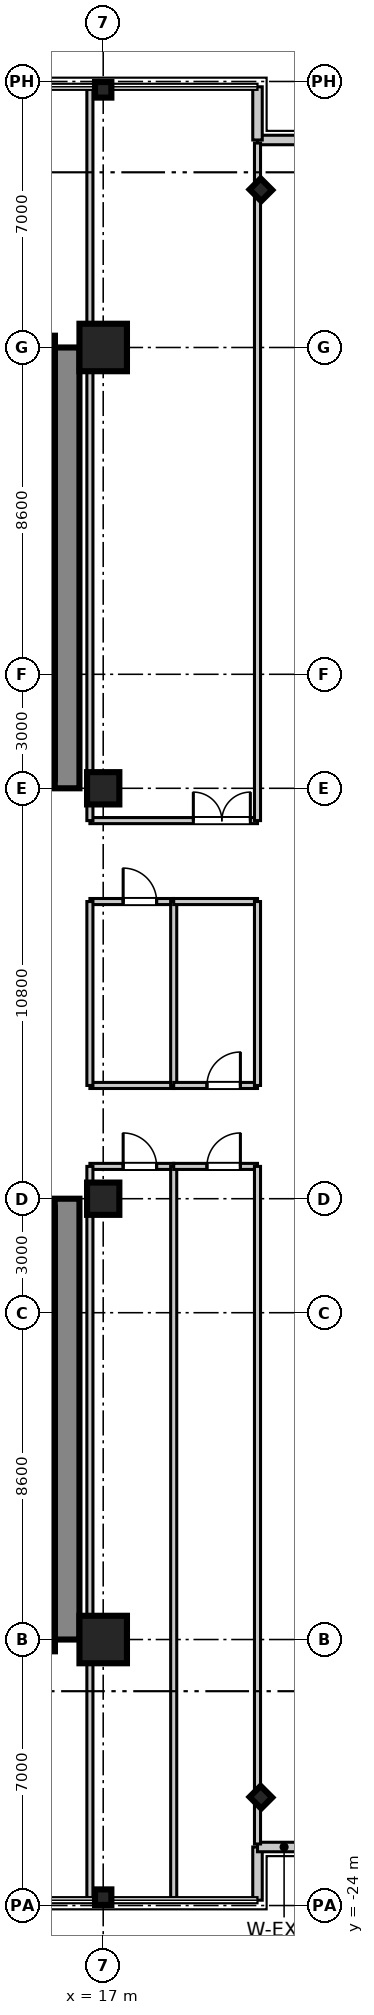
"""IFC4 building model, lengths in metres.
Left out: names, types, materials, properties, quantities, classifications, styles, units other than length and angle.
Written with IfcOpenShell. Run it as: python <this file> out.ifc"""

import sys

from ifc_helpers import new_model, si_unit, direction, frame, frame_2d, origin, origin_2d, place, context, subcontext, project, spatial, rectangle, i_section, extrude, source, transform, mapped, element, fill, save


model = new_model("IFC4")
c1 = context("Model", 3, precision=1e-05, world=origin(), true_north=direction((0.0, 1.0)))
c2 = subcontext(c1, "Body", "Model", "MODEL_VIEW")
j1 = project(units=[si_unit("LENGTHUNIT", "METRE"), si_unit("PLANEANGLEUNIT", "RADIAN")], contexts=[c1])
p1 = place(None, origin())
s1 = spatial("IfcSite", under=j1, at=p1, CompositionType="ELEMENT")
p2 = place(p1, origin())
s2 = spatial("IfcBuilding", under=s1, at=p2, CompositionType="ELEMENT")
p3 = place(p2, frame((0.0, 0.0, 102.9)))
s3 = spatial("IfcBuildingStorey", under=s2, at=p3, CompositionType="ELEMENT", Elevation=102.9)
m1 = source(origin(), c2, "Body", "SweptSolid", [
    extrude(rectangle(XDim=1.25, YDim=1.25, at=origin_2d()), origin(), (0.0, 0.0, 1.0), 3.605),
])
p4 = place(p3, frame((17.0, -17.0, 0.0), z_axis=(0.0, 0.0, 1.0), x_axis=(1.0, 0.0, 0.0)))
e1 = element("IfcColumn", 1, at=p4, inside=s3, PredefinedType="COLUMN", context=c2, shape_type="MappedRepresentation", body=[
    mapped(m1, transform((0.0, 0.0, 0.0), scale=1.0)),
])
m2 = source(origin(), c2, "Body", "SweptSolid", [
    extrude(rectangle(XDim=0.85, YDim=0.85, at=origin_2d()), origin(), (0.0, 0.0, 1.0), 3.605),
])
for number, where, z_axis, x_axis in (
    (2, (17.0, -5.4, 0.0), (0.0, 0.0, 1.0), (1.0, 0.0, 0.0)),
    (3, (17.0, 5.4, 0.0), (0.0, 0.0, 1.0), (1.0, 0.0, 0.0)),
):
    element("IfcColumn", number, at=place(p3, frame(where, z_axis=z_axis, x_axis=x_axis)), inside=s3, PredefinedType="PILASTER", context=c2, shape_type="MappedRepresentation", body=[
        mapped(m2, transform((0.0, 0.0, 0.0), scale=1.0)),
    ])
p5 = place(p3, frame((17.0, 17.0, 0.0), z_axis=(0.0, 0.0, 1.0), x_axis=(1.0, 0.0, 0.0)))
e4 = element("IfcColumn", 4, at=p5, inside=s3, PredefinedType="COLUMN", context=c2, shape_type="MappedRepresentation", body=[
    mapped(m1, transform((0.0, 0.0, 0.0), scale=1.0)),
])
m3 = source(origin(), c2, "Body", "SweptSolid", [
    extrude(i_section(OverallWidth=0.409, OverallDepth=0.43, WebThickness=0.021, FlangeThickness=0.034, at=origin_2d()), origin(), (0.0, 0.0, 1.0), 3.605),
])
for number, where, z_axis, x_axis in (
    (5, (17.0, -23.78, 0.0), (0.0, 0.0, 1.0), (0.0, 1.0, 0.0)),
    (6, (17.0, 23.78, 0.0), (0.0, 0.0, 1.0), (0.0, 1.0, 0.0)),
    (7, (21.15, -21.15, 0.0), (0.0, 0.0, 1.0), (0.707, 0.707, 0.0)),
    (8, (21.15, 21.15, 0.0), (0.0, 0.0, 1.0), (0.707, 0.707, 0.0)),
):
    element("IfcColumn", number, at=place(p3, frame(where, z_axis=z_axis, x_axis=x_axis)), inside=s3, PredefinedType="COLUMN", context=c2, shape_type="MappedRepresentation", body=[
        mapped(m3, transform((0.0, 0.0, 0.0), scale=1.0)),
    ])
m4 = source(origin(), c2, "Body", "SweptSolid", [
    extrude(rectangle(XDim=11.6, YDim=0.65, at=frame_2d((5.8, 0.0))), origin(), (0.0, 0.0, 1.0), 3.38),
])
for number, where, z_axis, x_axis in (
    (9, (16.05, 5.4, 0.0), (0.0, 0.0, 1.0), (0.0, 1.0, 0.0)),
    (10, (16.05, -17.0, 0.0), (0.0, 0.0, 1.0), (0.0, 1.0, 0.0)),
):
    element("IfcWall", number, at=place(p3, frame(where, z_axis=z_axis, x_axis=x_axis)), inside=s3, PredefinedType="SHEAR", context=c2, shape_type="MappedRepresentation", body=[
        mapped(m4, transform((0.0, 0.0, 0.0), scale=1.0)),
    ])
m5 = source(origin(), c2, "Body", "SweptSolid", [
    extrude(rectangle(XDim=2.36, YDim=0.22, at=frame_2d((1.18, 0.0))), origin(), (0.0, 0.0, 1.0), 3.38),
])
p6 = place(p3, frame((15.62, 5.64, 0.0), z_axis=(0.0, 0.0, 1.0), x_axis=(0.0, 1.0, 0.0)))
e11 = element("IfcWall", 11, at=p6, inside=s3, PredefinedType="SHEAR", context=c2, shape_type="MappedRepresentation", body=[
    mapped(m5, transform((0.0, 0.0, 0.0), scale=1.0)),
])
m6 = source(origin(), c2, "Body", "SweptSolid", [
    extrude(rectangle(XDim=2.2, YDim=0.22, at=frame_2d((1.1, 0.0))), origin(), (0.0, 0.0, 1.0), 3.38),
])
for number, where, z_axis, x_axis in (
    (12, (15.62, 8.0, 0.0), (0.0, 0.0, 1.0), (0.0, 1.0, 0.0)),
    (13, (15.62, 10.2, 0.0), (0.0, 0.0, 1.0), (0.0, 1.0, 0.0)),
):
    element("IfcWall", number, at=place(p3, frame(where, z_axis=z_axis, x_axis=x_axis)), inside=s3, PredefinedType="SHEAR", context=c2, shape_type="MappedRepresentation", body=[
        mapped(m6, transform((0.0, 0.0, 0.0), scale=1.0)),
    ])
m7 = source(origin(), c2, "Body", "SweptSolid", [
    extrude(rectangle(XDim=2.3, YDim=0.22, at=frame_2d((1.15, 0.0))), origin(), (0.0, 0.0, 1.0), 3.38),
])
p7 = place(p3, frame((15.62, 12.4, 0.0), z_axis=(0.0, 0.0, 1.0), x_axis=(0.0, 1.0, 0.0)))
e14 = element("IfcWall", 14, at=p7, inside=s3, PredefinedType="SHEAR", context=c2, shape_type="MappedRepresentation", body=[
    mapped(m7, transform((0.0, 0.0, 0.0), scale=1.0)),
])
p8 = place(p3, frame((15.62, -8.0, 0.0), z_axis=(0.0, 0.0, 1.0), x_axis=(0.0, 1.0, 0.0)))
e15 = element("IfcWall", 15, at=p8, inside=s3, PredefinedType="SHEAR", context=c2, shape_type="MappedRepresentation", body=[
    mapped(m5, transform((0.0, 0.0, 0.0), scale=1.0)),
])
for number, where, z_axis, x_axis in (
    (16, (15.62, -10.2, 0.0), (0.0, 0.0, 1.0), (0.0, 1.0, 0.0)),
    (17, (15.62, -12.4, 0.0), (0.0, 0.0, 1.0), (0.0, 1.0, 0.0)),
):
    element("IfcWall", number, at=place(p3, frame(where, z_axis=z_axis, x_axis=x_axis)), inside=s3, PredefinedType="SHEAR", context=c2, shape_type="MappedRepresentation", body=[
        mapped(m6, transform((0.0, 0.0, 0.0), scale=1.0)),
    ])
p9 = place(p3, frame((15.62, -14.7, 0.0), z_axis=(0.0, 0.0, 1.0), x_axis=(0.0, 1.0, 0.0)))
e18 = element("IfcWall", 18, at=p9, inside=s3, PredefinedType="SHEAR", context=c2, shape_type="MappedRepresentation", body=[
    mapped(m7, transform((0.0, 0.0, 0.0), scale=1.0)),
])
m8 = source(origin(), c2, "Body", "SweptSolid", [
    extrude(rectangle(XDim=2.61, YDim=0.22, at=frame_2d((1.305, 0.0))), origin(), (0.0, 0.0, 1.0), 3.38),
])
for number, where, z_axis, x_axis in (
    (19, (15.62, 14.7, 0.0), (0.0, 0.0, 1.0), (0.0, 1.0, 0.0)),
    (20, (15.62, -17.31, 0.0), (0.0, 0.0, 1.0), (0.0, 1.0, 0.0)),
):
    element("IfcWall", number, at=place(p3, frame(where, z_axis=z_axis, x_axis=x_axis)), inside=s3, PredefinedType="SHEAR", context=c2, shape_type="MappedRepresentation", body=[
        mapped(m8, transform((0.0, 0.0, 0.0), scale=1.0)),
    ])
m9 = source(origin(), c2, "Body", "SweptSolid", [
    extrude(rectangle(XDim=1.4, YDim=0.25, at=frame_2d((0.7, 0.0))), origin(), (0.0, 0.0, 1.0), 3.38),
])
p10 = place(p3, frame((21.06, -23.86, 0.0), z_axis=(0.0, 0.0, 1.0), x_axis=(0.0, 1.0, 0.0)))
e21 = element("IfcWall", 21, at=p10, inside=s3, PredefinedType="STANDARD", context=c2, shape_type="MappedRepresentation", body=[
    mapped(m9, transform((0.0, 0.0, 0.0), scale=1.0)),
])
m10 = source(origin(), c2, "Body", "SweptSolid", [
    extrude(rectangle(XDim=1.4, YDim=0.25, at=frame_2d((0.7, 0.0))), origin(), (0.0, 0.0, 1.0), 3.38),
])
for number, where, z_axis, x_axis in (
    (22, (21.06, -22.46, 0.0), (0.0, 0.0, 1.0), (1.0, 0.0, 0.0)),
    (23, (21.06, 22.46, 0.0), (0.0, 0.0, 1.0), (1.0, 0.0, 0.0)),
):
    element("IfcWall", number, at=place(p3, frame(where, z_axis=z_axis, x_axis=x_axis)), inside=s3, PredefinedType="STANDARD", context=c2, shape_type="MappedRepresentation", body=[
        mapped(m10, transform((0.0, 0.0, 0.0), scale=1.0)),
    ])
p11 = place(p3, frame((21.06, 22.46, 0.0), z_axis=(0.0, 0.0, 1.0), x_axis=(0.0, 1.0, 0.0)))
e24 = element("IfcWall", 24, at=p11, inside=s3, PredefinedType="STANDARD", context=c2, shape_type="MappedRepresentation", body=[
    mapped(m9, transform((0.0, 0.0, 0.0), scale=1.0)),
])
m11 = source(origin(), c2, "Body", "SweptSolid", [
    extrude(rectangle(XDim=4.41, YDim=0.16, at=frame_2d((2.205, 0.0))), origin(), (0.0, 0.0, 1.0), 2.72),
])
p12 = place(p3, frame((16.65, 4.55, 0.0), z_axis=(0.0, 0.0, 1.0), x_axis=(1.0, 0.0, 0.0)))
e25 = element("IfcWall", 25, at=p12, inside=s3, PredefinedType="PARTITIONING", context=c2, shape_type="MappedRepresentation", body=[
    mapped(m11, transform((0.0, 0.0, 0.0), scale=1.0)),
])
p13 = place(p12, frame((2.722, 0.0, 0.0)))
e26 = element("IfcOpeningElement", 26, at=p13, cuts=e25, PredefinedType="OPENING", context=c2, shape_type="SweptSolid", body=[
    extrude(rectangle(XDim=1.5, YDim=2.15, at=frame_2d((0.75, 1.075))), frame((0.0, 0.09, 0.0), z_axis=(0.0, -1.0, 0.0), x_axis=(1.0, 0.0, 0.0)), (0.0, 0.0, 1.0), 0.18),
])
m12 = source(origin(), c2, "Body", "SweptSolid", [
    extrude(rectangle(XDim=19.25, YDim=0.16, at=frame_2d((9.625, 0.0))), origin(), (0.0, 0.0, 1.0), 2.72),
])
p14 = place(p3, frame((16.65, 4.55, 0.0), z_axis=(0.0, 0.0, 1.0), x_axis=(0.0, 1.0, 0.0)))
e27 = element("IfcWall", 27, at=p14, inside=s3, PredefinedType="PARTITIONING", context=c2, shape_type="MappedRepresentation", body=[
    mapped(m12, transform((0.0, 0.0, 0.0), scale=1.0)),
])
m13 = source(origin(), c2, "Body", "SweptSolid", [
    extrude(rectangle(XDim=17.83, YDim=0.16, at=frame_2d((8.915, 0.0))), origin(), (0.0, 0.0, 1.0), 2.72),
])
p15 = place(p3, frame((21.06, 4.55, 0.0), z_axis=(0.0, 0.0, 1.0), x_axis=(0.0, 1.0, 0.0)))
e28 = element("IfcWall", 28, at=p15, inside=s3, PredefinedType="PARTITIONING", context=c2, shape_type="MappedRepresentation", body=[
    mapped(m13, transform((0.0, 0.0, 0.0), scale=1.0)),
])
m14 = source(origin(), c2, "Body", "SweptSolid", [
    extrude(rectangle(XDim=2.205, YDim=0.16, at=frame_2d((1.103, 0.0))), origin(), (0.0, 0.0, 1.0), 2.72),
])
p16 = place(p3, frame((16.65, -4.55, 0.0), z_axis=(0.0, 0.0, 1.0), x_axis=(1.0, 0.0, 0.0)))
e29 = element("IfcWall", 29, at=p16, inside=s3, PredefinedType="PARTITIONING", context=c2, shape_type="MappedRepresentation", body=[
    mapped(m14, transform((0.0, 0.0, 0.0), scale=1.0)),
])
p17 = place(p16, frame((0.875, 0.0, 0.0)))
e30 = element("IfcOpeningElement", 30, at=p17, cuts=e29, PredefinedType="OPENING", context=c2, shape_type="SweptSolid", body=[
    extrude(rectangle(XDim=0.88, YDim=2.1, at=frame_2d((0.44, 1.05))), frame((0.0, 0.09, 0.0), z_axis=(0.0, -1.0, 0.0), x_axis=(1.0, 0.0, 0.0)), (0.0, 0.0, 1.0), 0.18),
])
for number, where, z_axis, x_axis in (
    (31, (16.65, -23.8, 0.0), (0.0, 0.0, 1.0), (0.0, 1.0, 0.0)),
    (32, (18.855, -23.8, 0.0), (0.0, 0.0, 1.0), (0.0, 1.0, 0.0)),
):
    element("IfcWall", number, at=place(p3, frame(where, z_axis=z_axis, x_axis=x_axis)), inside=s3, PredefinedType="PARTITIONING", context=c2, shape_type="MappedRepresentation", body=[
        mapped(m12, transform((0.0, 0.0, 0.0), scale=1.0)),
    ])
p18 = place(p3, frame((18.855, -4.55, 0.0), z_axis=(0.0, 0.0, 1.0), x_axis=(1.0, 0.0, 0.0)))
e33 = element("IfcWall", 33, at=p18, inside=s3, PredefinedType="PARTITIONING", context=c2, shape_type="MappedRepresentation", body=[
    mapped(m14, transform((0.0, 0.0, 0.0), scale=1.0)),
])
p19 = place(p18, frame((0.875, 0.0, 0.0)))
e34 = element("IfcOpeningElement", 34, at=p19, cuts=e33, PredefinedType="OPENING", context=c2, shape_type="SweptSolid", body=[
    extrude(rectangle(XDim=0.88, YDim=2.1, at=frame_2d((0.44, 1.05))), frame((0.0, 0.09, 0.0), z_axis=(0.0, -1.0, 0.0), x_axis=(1.0, 0.0, 0.0)), (0.0, 0.0, 1.0), 0.18),
])
p20 = place(p3, frame((21.06, -22.38, 0.0), z_axis=(0.0, 0.0, 1.0), x_axis=(0.0, 1.0, 0.0)))
e35 = element("IfcWall", 35, at=p20, inside=s3, PredefinedType="PARTITIONING", context=c2, shape_type="MappedRepresentation", body=[
    mapped(m13, transform((0.0, 0.0, 0.0), scale=1.0)),
])
p21 = place(p3, frame((16.65, -2.42, 0.0), z_axis=(0.0, 0.0, 1.0), x_axis=(1.0, 0.0, 0.0)))
e36 = element("IfcWall", 36, at=p21, inside=s3, PredefinedType="PARTITIONING", context=c2, shape_type="MappedRepresentation", body=[
    mapped(m14, transform((0.0, 0.0, 0.0), scale=1.0)),
])
p22 = place(p3, frame((16.65, 2.42, 0.0), z_axis=(0.0, 0.0, 1.0), x_axis=(1.0, 0.0, 0.0)))
e37 = element("IfcWall", 37, at=p22, inside=s3, PredefinedType="PARTITIONING", context=c2, shape_type="MappedRepresentation", body=[
    mapped(m14, transform((0.0, 0.0, 0.0), scale=1.0)),
])
p23 = place(p22, frame((0.875, 0.0, 0.0)))
e38 = element("IfcOpeningElement", 38, at=p23, cuts=e37, PredefinedType="OPENING", context=c2, shape_type="SweptSolid", body=[
    extrude(rectangle(XDim=0.88, YDim=2.1, at=frame_2d((0.44, 1.05))), frame((0.0, 0.09, 0.0), z_axis=(0.0, -1.0, 0.0), x_axis=(1.0, 0.0, 0.0)), (0.0, 0.0, 1.0), 0.18),
])
m15 = source(origin(), c2, "Body", "SweptSolid", [
    extrude(rectangle(XDim=4.84, YDim=0.16, at=frame_2d((2.42, 0.0))), origin(), (0.0, 0.0, 1.0), 2.72),
])
for number, where, z_axis, x_axis in (
    (39, (16.65, -2.42, 0.0), (0.0, 0.0, 1.0), (0.0, 1.0, 0.0)),
    (40, (18.855, -2.42, 0.0), (0.0, 0.0, 1.0), (0.0, 1.0, 0.0)),
):
    element("IfcWall", number, at=place(p3, frame(where, z_axis=z_axis, x_axis=x_axis)), inside=s3, PredefinedType="PARTITIONING", context=c2, shape_type="MappedRepresentation", body=[
        mapped(m15, transform((0.0, 0.0, 0.0), scale=1.0)),
    ])
p24 = place(p3, frame((18.855, -2.42, 0.0), z_axis=(0.0, 0.0, 1.0), x_axis=(1.0, 0.0, 0.0)))
e41 = element("IfcWall", 41, at=p24, inside=s3, PredefinedType="PARTITIONING", context=c2, shape_type="MappedRepresentation", body=[
    mapped(m14, transform((0.0, 0.0, 0.0), scale=1.0)),
])
p25 = place(p24, frame((0.875, 0.0, 0.0)))
e42 = element("IfcOpeningElement", 42, at=p25, cuts=e41, PredefinedType="OPENING", context=c2, shape_type="SweptSolid", body=[
    extrude(rectangle(XDim=0.88, YDim=2.1, at=frame_2d((0.44, 1.05))), frame((0.0, 0.09, 0.0), z_axis=(0.0, -1.0, 0.0), x_axis=(1.0, 0.0, 0.0)), (0.0, 0.0, 1.0), 0.18),
])
p26 = place(p3, frame((18.855, 2.42, 0.0), z_axis=(0.0, 0.0, 1.0), x_axis=(1.0, 0.0, 0.0)))
e43 = element("IfcWall", 43, at=p26, inside=s3, PredefinedType="PARTITIONING", context=c2, shape_type="MappedRepresentation", body=[
    mapped(m14, transform((0.0, 0.0, 0.0), scale=1.0)),
])
p27 = place(p3, frame((21.06, -2.42, 0.0), z_axis=(0.0, 0.0, 1.0), x_axis=(0.0, 1.0, 0.0)))
e44 = element("IfcWall", 44, at=p27, inside=s3, PredefinedType="PARTITIONING", context=c2, shape_type="MappedRepresentation", body=[
    mapped(m15, transform((0.0, 0.0, 0.0), scale=1.0)),
])
m16 = source(origin(), c2, "Body", "SweptSolid", [
    extrude(rectangle(XDim=1.5, YDim=2.15, at=frame_2d((0.75, 1.075))), frame((0.0, 0.025, 0.0), z_axis=(0.0, -1.0, 0.0), x_axis=(1.0, 0.0, 0.0)), (0.0, 0.0, 1.0), 0.05),
])
p28 = place(p13, origin())
e45 = element("IfcDoor", 45, at=p28, inside=s3, OperationType="DOUBLE_DOOR_SINGLE_SWING", PredefinedType="DOOR", context=c2, shape_type="MappedRepresentation", body=[
    mapped(m16, transform((0.0, 0.0, 0.0), scale=1.0)),
])
fill(e26, e45)
m17 = source(origin(), c2, "Body", "SweptSolid", [
    extrude(rectangle(XDim=0.88, YDim=2.1, at=frame_2d((0.44, 1.05))), frame((0.0, 0.025, 0.0), z_axis=(0.0, -1.0, 0.0), x_axis=(1.0, 0.0, 0.0)), (0.0, 0.0, 1.0), 0.05),
])
p29 = place(p17, frame((0.88, 0.0, 0.0), z_axis=(0.0, 0.0, 1.0), x_axis=(-1.0, 0.0, 0.0)))
e46 = element("IfcDoor", 46, at=p29, inside=s3, OperationType="SINGLE_SWING_LEFT", PredefinedType="DOOR", context=c2, shape_type="MappedRepresentation", body=[
    mapped(m17, transform((0.0, 0.0, 0.0), scale=1.0)),
])
fill(e30, e46)
p30 = place(p19, frame((0.88, 0.0, 0.0), z_axis=(0.0, 0.0, 1.0), x_axis=(-1.0, 0.0, 0.0)))
e47 = element("IfcDoor", 47, at=p30, inside=s3, OperationType="SINGLE_SWING_RIGHT", PredefinedType="DOOR", context=c2, shape_type="MappedRepresentation", body=[
    mapped(m17, transform((0.0, 0.0, 0.0), scale=1.0)),
])
fill(e34, e47)
p31 = place(p23, frame((0.88, 0.0, 0.0), z_axis=(0.0, 0.0, 1.0), x_axis=(-1.0, 0.0, 0.0)))
e48 = element("IfcDoor", 48, at=p31, inside=s3, OperationType="SINGLE_SWING_LEFT", PredefinedType="DOOR", context=c2, shape_type="MappedRepresentation", body=[
    mapped(m17, transform((0.0, 0.0, 0.0), scale=1.0)),
])
fill(e38, e48)
p32 = place(p25, origin())
e49 = element("IfcDoor", 49, at=p32, inside=s3, OperationType="SINGLE_SWING_RIGHT", PredefinedType="DOOR", context=c2, shape_type="MappedRepresentation", body=[
    mapped(m17, transform((0.0, 0.0, 0.0), scale=1.0)),
])
fill(e42, e49)
save(model, sys.argv[1])
